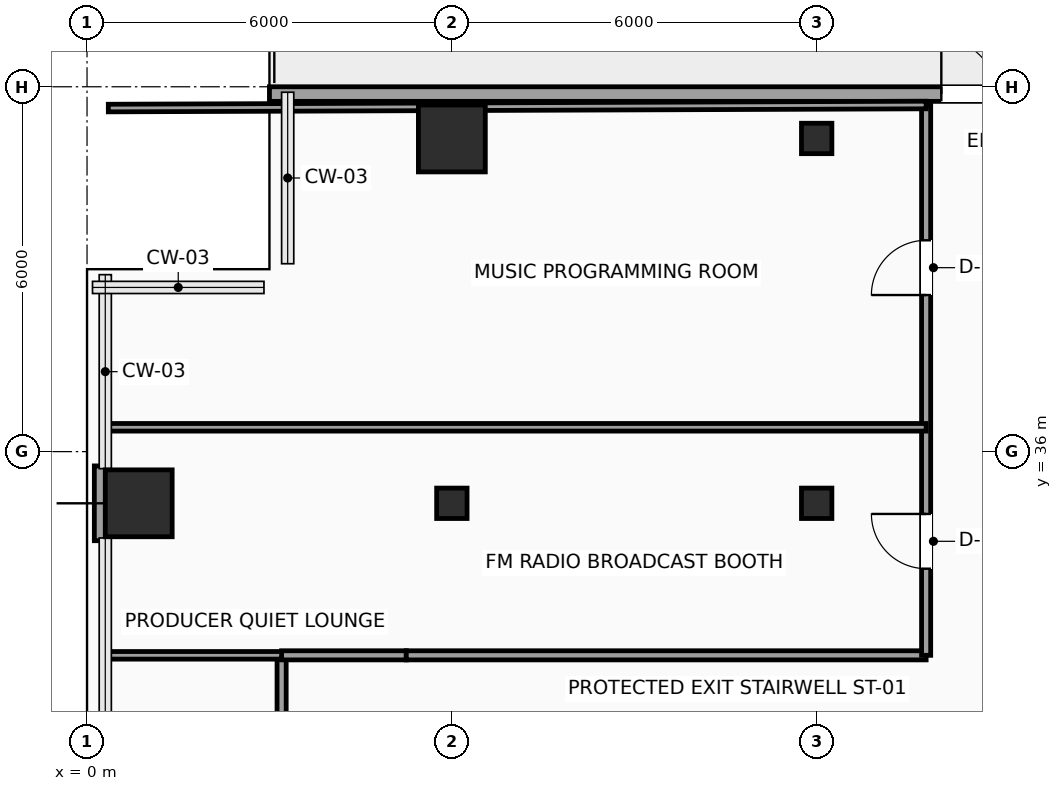
"""IFC4 building model, lengths in metres.
Left out: names, types, materials, properties, quantities, classifications, styles, units other than length and angle.
Written with IfcOpenShell. Run it as: python <this file> out.ifc"""

import sys

from ifc_helpers import new_model, si_unit, direction, frame, frame_2d, origin, origin_2d, place, context, subcontext, project, spatial, rectangle, hollow_rectangle, extrude, element, fill, save


model = new_model("IFC4")
c1 = context("Model", 3, precision=1e-05, world=origin(), true_north=direction((0.0, 1.0)))
c2 = subcontext(c1, "Body", "Model", "MODEL_VIEW")
j1 = project(units=[si_unit("LENGTHUNIT", "METRE"), si_unit("PLANEANGLEUNIT", "RADIAN")], contexts=[c1])
p1 = place(None, origin())
s1 = spatial("IfcSite", under=j1, at=p1, CompositionType="ELEMENT")
p2 = place(p1, origin())
s2 = spatial("IfcBuilding", under=s1, at=p2, CompositionType="ELEMENT")
p3 = place(p2, frame((0.0, 0.0, 99.6)))
s3 = spatial("IfcBuildingStorey", under=s2, at=p3, CompositionType="ELEMENT", Elevation=99.6)
p4 = place(p3, frame((0.85, 35.15, 0.0), z_axis=(0.0, 0.0, 1.0), x_axis=(1.0, 0.0, 0.0)))
e1 = element("IfcColumn", 1, at=p4, inside=s3, PredefinedType="COLUMN", context=c2, shape_type="SweptSolid", body=[
    extrude(rectangle(XDim=1.1, YDim=1.1, at=origin_2d()), origin(), (0.0, 0.0, 1.0), 3.75),
])
p5 = place(p3, frame((6.0, 35.15, 0.0), z_axis=(0.0, 0.0, 1.0), x_axis=(1.0, 0.0, 0.0)))
e2 = element("IfcColumn", 2, at=p5, inside=s3, PredefinedType="COLUMN", context=c2, shape_type="SweptSolid", body=[
    extrude(hollow_rectangle(XDim=0.5, YDim=0.5, WallThickness=0.025, InnerFilletRadius=0.025, OuterFilletRadius=0.04, at=origin_2d()), origin(), (0.0, 0.0, 1.0), 3.75),
])
p6 = place(p3, frame((6.0, 41.15, 0.0), z_axis=(0.0, 0.0, 1.0), x_axis=(1.0, 0.0, 0.0)))
e3 = element("IfcColumn", 3, at=p6, inside=s3, PredefinedType="COLUMN", context=c2, shape_type="SweptSolid", body=[
    extrude(rectangle(XDim=1.1, YDim=1.1, at=origin_2d()), origin(), (0.0, 0.0, 1.0), 3.75),
])
for number, where, z_axis, x_axis in (
    (4, (12.0, 35.15, 0.0), (0.0, 0.0, 1.0), (1.0, 0.0, 0.0)),
    (5, (12.0, 41.15, 0.0), (0.0, 0.0, 1.0), (1.0, 0.0, 0.0)),
):
    element("IfcColumn", number, at=place(p3, frame(where, z_axis=z_axis, x_axis=x_axis)), inside=s3, PredefinedType="COLUMN", context=c2, shape_type="SweptSolid", body=[
        extrude(hollow_rectangle(XDim=0.5, YDim=0.5, WallThickness=0.025, InnerFilletRadius=0.025, OuterFilletRadius=0.04, at=origin_2d()), origin(), (0.0, 0.0, 1.0), 3.75),
    ])
p7 = place(p3, frame((3.0, 41.88, 0.0), z_axis=(0.0, 0.0, 1.0), x_axis=(1.0, 0.0, 0.0)))
e6 = element("IfcWall", 6, at=p7, inside=s3, PredefinedType="SOLIDWALL", context=c2, shape_type="SweptSolid", body=[
    extrude(rectangle(XDim=18.0, YDim=0.24, at=frame_2d((9.0, 0.0))), origin(), (0.0, 0.0, 1.0), 3.525),
])
p8 = place(p7, frame((11.05, 0.0, 0.0)))
e7 = element("IfcOpeningElement", 7, at=p8, cuts=e6, PredefinedType="OPENING", context=c2, shape_type="SweptSolid", body=[
    extrude(rectangle(XDim=1.8, YDim=2.4, at=frame_2d((0.9, 1.2))), frame((0.0, 0.13, 0.0), z_axis=(0.0, -1.0, 0.0), x_axis=(1.0, 0.0, 0.0)), (0.0, 0.0, 1.0), 0.26),
])
p9 = place(p3, frame((0.24, 34.535, 0.0), z_axis=(0.0, 0.0, 1.0), x_axis=(0.0, 1.0, 0.0)))
e8 = element("IfcWall", 8, at=p9, inside=s3, PredefinedType="SOLIDWALL", context=c2, shape_type="SweptSolid", body=[
    extrude(rectangle(XDim=1.23, YDim=0.24, at=frame_2d((0.615, 0.0))), origin(), (0.0, 0.0, 1.0), 3.525),
])
p10 = place(p3, frame((3.2, 30.25, 0.0), z_axis=(0.0, 0.0, 1.0), x_axis=(0.0, 1.0, 0.0)))
e9 = element("IfcWall", 9, at=p10, inside=s3, PredefinedType="PARTITIONING", context=c2, shape_type="SweptSolid", body=[
    extrude(rectangle(XDim=2.4, YDim=0.15, at=frame_2d((1.2, 0.0))), origin(), (0.0, 0.0, 1.0), 3.525),
])
p11 = place(p3, frame((3.2, 32.65, 0.0), z_axis=(0.0, 0.0, 1.0), x_axis=(1.0, 0.0, 0.0)))
e10 = element("IfcWall", 10, at=p11, inside=s3, PredefinedType="PARTITIONING", context=c2, shape_type="SweptSolid", body=[
    extrude(rectangle(XDim=2.05, YDim=0.15, at=frame_2d((1.025, 0.0))), origin(), (0.0, 0.0, 1.0), 3.525),
])
p12 = place(p3, frame((5.25, 32.65, 0.0), z_axis=(0.0, 0.0, 1.0), x_axis=(1.0, 0.0, 0.0)))
e11 = element("IfcWall", 11, at=p12, inside=s3, PredefinedType="PARTITIONING", context=c2, shape_type="SweptSolid", body=[
    extrude(rectangle(XDim=8.55, YDim=0.15, at=frame_2d((4.275, 0.0))), origin(), (0.0, 0.0, 1.0), 3.525),
])
p13 = place(p3, frame((13.8, 32.65, 0.0), z_axis=(0.0, 0.0, 1.0), x_axis=(0.0, 1.0, 0.0)))
e12 = element("IfcWall", 12, at=p13, inside=s3, PredefinedType="PARTITIONING", context=c2, shape_type="SweptSolid", body=[
    extrude(rectangle(XDim=9.05, YDim=0.15, at=frame_2d((4.525, 0.0))), origin(), (0.0, 0.0, 1.0), 3.525),
])
p14 = place(p13, frame((1.425, 0.0, 0.0)))
e13 = element("IfcOpeningElement", 13, at=p14, cuts=e12, PredefinedType="OPENING", context=c2, shape_type="SweptSolid", body=[
    extrude(rectangle(XDim=0.9, YDim=2.1, at=frame_2d((0.45, 1.05))), frame((0.0, 0.085, 0.0), z_axis=(0.0, -1.0, 0.0), x_axis=(1.0, 0.0, 0.0)), (0.0, 0.0, 1.0), 0.17),
])
p15 = place(p13, frame((5.925, 0.0, 0.0)))
e14 = element("IfcOpeningElement", 14, at=p15, cuts=e12, PredefinedType="OPENING", context=c2, shape_type="SweptSolid", body=[
    extrude(rectangle(XDim=0.9, YDim=2.1, at=frame_2d((0.45, 1.05))), frame((0.0, 0.085, 0.0), z_axis=(0.0, -1.0, 0.0), x_axis=(1.0, 0.0, 0.0)), (0.0, 0.0, 1.0), 0.17),
])
p16 = place(p3, frame((0.3, 36.4, 0.0), z_axis=(0.0, 0.0, 1.0), x_axis=(1.0, 0.0, 0.0)))
e15 = element("IfcWall", 15, at=p16, inside=s3, PredefinedType="PARTITIONING", context=c2, shape_type="SweptSolid", body=[
    extrude(rectangle(XDim=13.5, YDim=0.125, at=frame_2d((6.75, 0.0))), origin(), (0.0, 0.0, 1.0), 3.525),
])
p17 = place(p3, frame((0.35, 41.65, 0.0), z_axis=(0.0, 0.0, 1.0), x_axis=(0.99999307672, 0.003721090209, 0.0)))
e16 = element("IfcWall", 16, at=p17, inside=s3, PredefinedType="PARTITIONING", context=c2, shape_type="SweptSolid", body=[
    extrude(rectangle(XDim=13.45, YDim=0.125, at=frame_2d((6.725, 0.0))), origin(), (0.0, 0.0, 1.0), 3.525),
])
p18 = place(p3, frame((0.3, 32.65, 0.0), z_axis=(0.0, 0.0, 1.0), x_axis=(1.0, 0.0, 0.0)))
e17 = element("IfcWall", 17, at=p18, inside=s3, PredefinedType="PARTITIONING", context=c2, shape_type="SweptSolid", body=[
    extrude(rectangle(XDim=2.9, YDim=0.125, at=frame_2d((1.45, 0.0))), origin(), (0.0, 0.0, 1.0), 3.525),
])
p19 = place(p8, origin())
e18 = element("IfcDoor", 18, at=p19, inside=s3, OperationType="DOUBLE_DOOR_SINGLE_SWING", PredefinedType="DOOR", context=c2, shape_type="SweptSolid", body=[
    extrude(rectangle(XDim=1.8, YDim=2.4, at=frame_2d((0.9, 1.2))), frame((0.0, 0.025, 0.0), z_axis=(0.0, -1.0, 0.0), x_axis=(1.0, 0.0, 0.0)), (0.0, 0.0, 1.0), 0.05),
])
fill(e7, e18)
p20 = place(p14, origin())
e19 = element("IfcDoor", 19, at=p20, inside=s3, OperationType="SINGLE_SWING_RIGHT", PredefinedType="DOOR", context=c2, shape_type="SweptSolid", body=[
    extrude(rectangle(XDim=0.9, YDim=2.1, at=frame_2d((0.45, 1.05))), frame((0.0, 0.025, 0.0), z_axis=(0.0, -1.0, 0.0), x_axis=(1.0, 0.0, 0.0)), (0.0, 0.0, 1.0), 0.05),
])
fill(e13, e19)
p21 = place(p15, origin())
e20 = element("IfcDoor", 20, at=p21, inside=s3, OperationType="SINGLE_SWING_LEFT", PredefinedType="DOOR", context=c2, shape_type="SweptSolid", body=[
    extrude(rectangle(XDim=0.9, YDim=2.1, at=frame_2d((0.45, 1.05))), frame((0.0, 0.025, 0.0), z_axis=(0.0, -1.0, 0.0), x_axis=(1.0, 0.0, 0.0)), (0.0, 0.0, 1.0), 0.05),
])
fill(e14, e20)
save(model, sys.argv[1])
